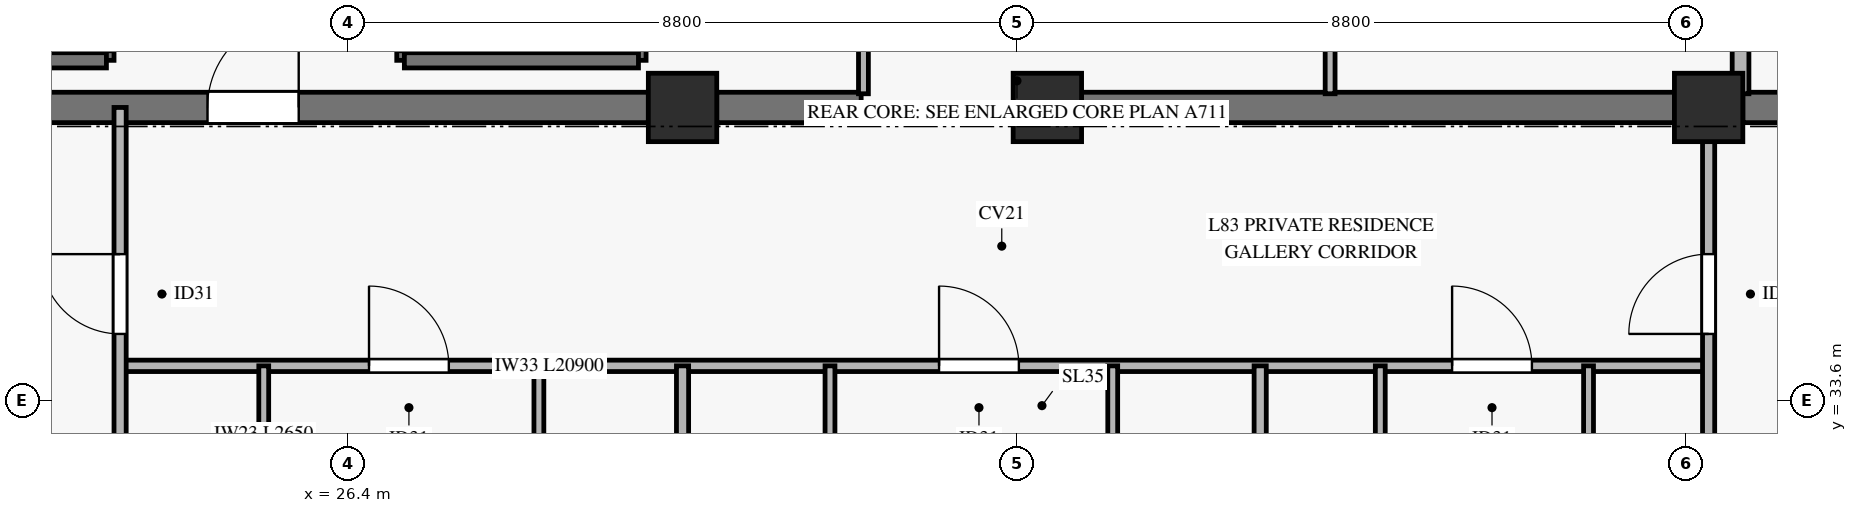
"""IFC4 building model, lengths in metres.
Left out: names, types, materials, properties, quantities, classifications, styles, units other than length and angle.
Written with IfcOpenShell. Run it as: python <this file> out.ifc"""

import sys

from ifc_helpers import new_model, si_unit, direction, frame, frame_2d, origin, origin_2d, place, context, subcontext, project, spatial, rectangle, extrude, source, transform, mapped, element, fill, save


model = new_model("IFC4")
c1 = context("Model", 3, precision=1e-05, world=origin(), true_north=direction((0.0, 1.0)))
c2 = subcontext(c1, "Body", "Model", "MODEL_VIEW")
j1 = project(units=[si_unit("LENGTHUNIT", "METRE"), si_unit("PLANEANGLEUNIT", "RADIAN")], contexts=[c1])
p1 = place(None, origin())
s1 = spatial("IfcSite", under=j1, at=p1, CompositionType="ELEMENT")
p2 = place(p1, origin())
s2 = spatial("IfcBuilding", under=s1, at=p2, CompositionType="ELEMENT")
p3 = place(p2, frame((0.0, 0.0, 321.0)))
s3 = spatial("IfcBuildingStorey", under=s2, at=p3, CompositionType="ELEMENT", Elevation=321.0)
m1 = source(origin(), c2, "Body", "SweptSolid", [
    extrude(rectangle(XDim=0.9, YDim=0.9, at=origin_2d()), origin(), (0.0, 0.0, 1.0), 3.185),
])
for number, where, z_axis, x_axis in (
    (1, (30.8, 37.45, 0.0), (0.0, 0.0, 1.0), (1.0, 0.0, 0.0)),
    (2, (35.6, 37.45, 0.0), (0.0, 0.0, 1.0), (1.0, 0.0, 0.0)),
    (3, (44.3, 37.45, 0.0), (0.0, 0.0, 1.0), (1.0, 0.0, 0.0)),
):
    element("IfcColumn", number, at=place(p3, frame(where, z_axis=z_axis, x_axis=x_axis)), inside=s3, PredefinedType="PILASTER", context=c2, shape_type="MappedRepresentation", body=[
        mapped(m1, transform((0.0, 0.0, 0.0), x_axis=(1.0, 0.0, 0.0), y_axis=(0.0, 1.0, 0.0), z_axis=(0.0, 0.0, 1.0), scale=1.0)),
    ])
p4 = place(p3, frame((20.3, 37.45, 0.0), z_axis=(0.0, 0.0, 1.0), x_axis=(1.0, 0.0, 0.0)))
e4 = element("IfcWall", 4, at=p4, inside=s3, PredefinedType="SHEAR", context=c2, shape_type="SweptSolid", body=[
    extrude(rectangle(XDim=10.05, YDim=0.4, at=frame_2d((5.025, 0.0))), origin(), (0.0, 0.0, 1.0), 3.185),
])
p5 = place(p4, frame((4.25, 0.0, 0.0)))
e5 = element("IfcOpeningElement", 5, at=p5, cuts=e4, PredefinedType="OPENING", context=c2, shape_type="SweptSolid", body=[
    extrude(rectangle(XDim=1.2, YDim=2.15, at=frame_2d((0.6, 1.075))), frame((0.0, 0.21, 0.0), z_axis=(0.0, -1.0, 0.0), x_axis=(1.0, 0.0, 0.0)), (0.0, 0.0, 1.0), 0.42),
])
p6 = place(p3, frame((31.25, 37.45, 0.0), z_axis=(0.0, 0.0, 1.0), x_axis=(1.0, 0.0, 0.0)))
e6 = element("IfcWall", 6, at=p6, inside=s3, PredefinedType="SHEAR", context=c2, shape_type="SweptSolid", body=[
    extrude(rectangle(XDim=1.9, YDim=0.4, at=frame_2d((0.95, 0.0))), origin(), (0.0, 0.0, 1.0), 3.185),
])
p7 = place(p3, frame((36.05, 37.45, 0.0), z_axis=(0.0, 0.0, 1.0), x_axis=(1.0, 0.0, 0.0)))
e7 = element("IfcWall", 7, at=p7, inside=s3, PredefinedType="SHEAR", context=c2, shape_type="SweptSolid", body=[
    extrude(rectangle(XDim=7.8, YDim=0.4, at=frame_2d((3.9, 0.0))), origin(), (0.0, 0.0, 1.0), 3.185),
])
p8 = place(p3, frame((44.75, 37.45, 0.0), z_axis=(0.0, 0.0, 1.0), x_axis=(1.0, 0.0, 0.0)))
e8 = element("IfcWall", 8, at=p8, inside=s3, PredefinedType="SHEAR", context=c2, shape_type="SweptSolid", body=[
    extrude(rectangle(XDim=5.35, YDim=0.4, at=frame_2d((2.675, 0.0))), origin(), (0.0, 0.0, 1.0), 3.185),
])
p9 = place(p8, frame((0.7, 0.0, 0.0)))
e9 = element("IfcOpeningElement", 9, at=p9, cuts=e8, PredefinedType="OPENING", context=c2, shape_type="SweptSolid", body=[
    extrude(rectangle(XDim=1.2, YDim=2.15, at=frame_2d((0.6, 1.075))), frame((0.0, 0.21, 0.0), z_axis=(0.0, -1.0, 0.0), x_axis=(1.0, 0.0, 0.0)), (0.0, 0.0, 1.0), 0.42),
])
p10 = place(p3, frame((23.22, 38.07, 0.0), z_axis=(0.0, 0.0, 1.0), x_axis=(0.0, 1.0, 0.0)))
e10 = element("IfcWall", 10, at=p10, inside=s3, PredefinedType="SOLIDWALL", context=c2, shape_type="SweptSolid", body=[
    extrude(rectangle(XDim=7.25, YDim=0.2, at=frame_2d((3.625, 0.0))), origin(), (0.0, 0.0, 1.0), 3.4),
])
p11 = place(p10, frame((0.11, 0.0, 0.0)))
e11 = element("IfcOpeningElement", 11, at=p11, cuts=e10, PredefinedType="OPENING", context=c2, shape_type="SweptSolid", body=[
    extrude(rectangle(XDim=1.1, YDim=2.15, at=frame_2d((0.55, 1.075))), frame((0.0, 0.11, 0.0), z_axis=(0.0, -1.0, 0.0), x_axis=(1.0, 0.0, 0.0)), (0.0, 0.0, 1.0), 0.22),
])
p12 = place(p3, frame((20.17, 38.07, 0.0), z_axis=(0.0, 0.0, 1.0), x_axis=(1.0, 0.0, 0.0)))
e12 = element("IfcWall", 12, at=p12, inside=s3, PredefinedType="SOLIDWALL", context=c2, shape_type="SweptSolid", body=[
    extrude(rectangle(XDim=3.05, YDim=0.2, at=frame_2d((1.525, 0.0))), origin(), (0.0, 0.0, 1.0), 3.4),
])
p13 = place(p3, frame((27.14, 38.07, 0.0), z_axis=(0.0, 0.0, 1.0), x_axis=(0.0, 1.0, 0.0)))
e13 = element("IfcWall", 13, at=p13, inside=s3, PredefinedType="SOLIDWALL", context=c2, shape_type="SweptSolid", body=[
    extrude(rectangle(XDim=7.25, YDim=0.2, at=frame_2d((3.625, 0.0))), origin(), (0.0, 0.0, 1.0), 3.4),
])
p14 = place(p13, frame((0.11, 0.0, 0.0)))
e14 = element("IfcOpeningElement", 14, at=p14, cuts=e13, PredefinedType="OPENING", context=c2, shape_type="SweptSolid", body=[
    extrude(rectangle(XDim=1.1, YDim=2.15, at=frame_2d((0.55, 1.075))), frame((0.0, 0.11, 0.0), z_axis=(0.0, -1.0, 0.0), x_axis=(1.0, 0.0, 0.0)), (0.0, 0.0, 1.0), 0.22),
])
p15 = place(p3, frame((30.22, 38.07, 0.0), z_axis=(0.0, 0.0, 1.0), x_axis=(0.0, 1.0, 0.0)))
e15 = element("IfcWall", 15, at=p15, inside=s3, PredefinedType="SOLIDWALL", context=c2, shape_type="SweptSolid", body=[
    extrude(rectangle(XDim=7.25, YDim=0.2, at=frame_2d((3.625, 0.0))), origin(), (0.0, 0.0, 1.0), 3.4),
])
p16 = place(p3, frame((27.14, 38.07, 0.0), z_axis=(0.0, 0.0, 1.0), x_axis=(1.0, 0.0, 0.0)))
e16 = element("IfcWall", 16, at=p16, inside=s3, PredefinedType="SOLIDWALL", context=c2, shape_type="SweptSolid", body=[
    extrude(rectangle(XDim=3.08, YDim=0.2, at=frame_2d((1.54, 0.0))), origin(), (0.0, 0.0, 1.0), 3.4),
])
p17 = place(p3, frame((44.72, 37.63, 0.0), z_axis=(0.0, 0.0, 1.0), x_axis=(0.0, 1.0, 0.0)))
e17 = element("IfcWall", 17, at=p17, inside=s3, PredefinedType="SOLIDWALL", context=c2, shape_type="SweptSolid", body=[
    extrude(rectangle(XDim=7.59, YDim=0.22, at=frame_2d((3.795, 0.0))), origin(), (0.0, 0.0, 1.0), 3.185),
])
p18 = place(p3, frame((33.18, 37.63, 0.0), z_axis=(0.0, 0.0, 1.0), x_axis=(0.0, 1.0, 0.0)))
e18 = element("IfcWall", 18, at=p18, inside=s3, PredefinedType="PARTITIONING", context=c2, shape_type="SweptSolid", body=[
    extrude(rectangle(XDim=6.52, YDim=0.13, at=frame_2d((3.26, 0.0))), origin(), (0.0, 0.0, 1.0), 2.27),
])
p19 = place(p18, frame((2.27, 0.0, 0.0)))
e19 = element("IfcOpeningElement", 19, at=p19, cuts=e18, PredefinedType="OPENING", context=c2, shape_type="SweptSolid", body=[
    extrude(rectangle(XDim=0.9, YDim=2.1, at=frame_2d((0.45, 1.05))), frame((0.0, 0.075, 0.0), z_axis=(0.0, -1.0, 0.0), x_axis=(1.0, 0.0, 0.0)), (0.0, 0.0, 1.0), 0.15),
])
p20 = place(p3, frame((39.32, 37.63, 0.0), z_axis=(0.0, 0.0, 1.0), x_axis=(0.0, 1.0, 0.0)))
e20 = element("IfcWall", 20, at=p20, inside=s3, PredefinedType="PARTITIONING", context=c2, shape_type="SweptSolid", body=[
    extrude(rectangle(XDim=8.74, YDim=0.13, at=frame_2d((4.37, 0.0))), origin(), (0.0, 0.0, 1.0), 3.185),
])
p21 = place(p20, frame((4.89, 0.0, 0.0)))
e21 = element("IfcOpeningElement", 21, at=p21, cuts=e20, PredefinedType="OPENING", context=c2, shape_type="SweptSolid", body=[
    extrude(rectangle(XDim=0.9, YDim=2.1, at=frame_2d((0.45, 1.05))), frame((0.0, 0.075, 0.0), z_axis=(0.0, -1.0, 0.0), x_axis=(1.0, 0.0, 0.0)), (0.0, 0.0, 1.0), 0.15),
])
p22 = place(p3, frame((23.4, 34.05, 0.0), z_axis=(0.0, 0.0, 1.0), x_axis=(1.0, 0.0, 0.0)))
e22 = element("IfcWall", 22, at=p22, inside=s3, PredefinedType="PARTITIONING", context=c2, shape_type="SweptSolid", body=[
    extrude(rectangle(XDim=20.9, YDim=0.15, at=frame_2d((10.45, 0.0))), origin(), (0.0, 0.0, 1.0), 2.47),
])
p23 = place(p22, frame((3.275, 0.0, 0.0)))
e23 = element("IfcOpeningElement", 23, at=p23, cuts=e22, PredefinedType="OPENING", context=c2, shape_type="SweptSolid", body=[
    extrude(rectangle(XDim=1.05, YDim=2.15, at=frame_2d((0.525, 1.075))), frame((0.0, 0.085, 0.0), z_axis=(0.0, -1.0, 0.0), x_axis=(1.0, 0.0, 0.0)), (0.0, 0.0, 1.0), 0.17),
])
p24 = place(p22, frame((10.775, 0.0, 0.0)))
e24 = element("IfcOpeningElement", 24, at=p24, cuts=e22, PredefinedType="OPENING", context=c2, shape_type="SweptSolid", body=[
    extrude(rectangle(XDim=1.05, YDim=2.15, at=frame_2d((0.525, 1.075))), frame((0.0, 0.085, 0.0), z_axis=(0.0, -1.0, 0.0), x_axis=(1.0, 0.0, 0.0)), (0.0, 0.0, 1.0), 0.17),
])
p25 = place(p22, frame((17.525, 0.0, 0.0)))
e25 = element("IfcOpeningElement", 25, at=p25, cuts=e22, PredefinedType="OPENING", context=c2, shape_type="SweptSolid", body=[
    extrude(rectangle(XDim=1.05, YDim=2.15, at=frame_2d((0.525, 1.075))), frame((0.0, 0.085, 0.0), z_axis=(0.0, -1.0, 0.0), x_axis=(1.0, 0.0, 0.0)), (0.0, 0.0, 1.0), 0.17),
])
p26 = place(p3, frame((23.4, 20.704, 0.0), z_axis=(0.0, 0.0, 1.0), x_axis=(0.0, 1.0, 0.0)))
e26 = element("IfcWall", 26, at=p26, inside=s3, PredefinedType="PARTITIONING", context=c2, shape_type="SweptSolid", body=[
    extrude(rectangle(XDim=16.746, YDim=0.16, at=frame_2d((8.373, 0.0))), origin(), (0.0, 0.0, 1.0), 2.77),
])
p27 = place(p26, frame((13.766, 0.0, 0.0)))
e27 = element("IfcOpeningElement", 27, at=p27, cuts=e26, PredefinedType="OPENING", context=c2, shape_type="SweptSolid", body=[
    extrude(rectangle(XDim=1.05, YDim=2.15, at=frame_2d((0.525, 1.075))), frame((0.0, 0.09, 0.0), z_axis=(0.0, -1.0, 0.0), x_axis=(1.0, 0.0, 0.0)), (0.0, 0.0, 1.0), 0.18),
])
p28 = place(p3, frame((30.8, 20.704, 0.0), z_axis=(0.0, 0.0, 1.0), x_axis=(0.0, 1.0, 0.0)))
e28 = element("IfcWall", 28, at=p28, inside=s3, PredefinedType="PARTITIONING", context=c2, shape_type="SweptSolid", body=[
    extrude(rectangle(XDim=13.346, YDim=0.16, at=frame_2d((6.673, 0.0))), origin(), (0.0, 0.0, 1.0), 2.47),
])
p29 = place(p3, frame((38.4, 20.704, 0.0), z_axis=(0.0, 0.0, 1.0), x_axis=(0.0, 1.0, 0.0)))
e29 = element("IfcWall", 29, at=p29, inside=s3, PredefinedType="PARTITIONING", context=c2, shape_type="SweptSolid", body=[
    extrude(rectangle(XDim=13.346, YDim=0.16, at=frame_2d((6.673, 0.0))), origin(), (0.0, 0.0, 1.0), 2.77),
])
p30 = place(p3, frame((44.3, 20.704, 0.0), z_axis=(0.0, 0.0, 1.0), x_axis=(0.0, 1.0, 0.0)))
e30 = element("IfcWall", 30, at=p30, inside=s3, PredefinedType="PARTITIONING", context=c2, shape_type="SweptSolid", body=[
    extrude(rectangle(XDim=16.746, YDim=0.16, at=frame_2d((8.373, 0.0))), origin(), (0.0, 0.0, 1.0), 2.47),
])
p31 = place(p30, frame((13.766, 0.0, 0.0)))
e31 = element("IfcOpeningElement", 31, at=p31, cuts=e30, PredefinedType="OPENING", context=c2, shape_type="SweptSolid", body=[
    extrude(rectangle(XDim=1.05, YDim=2.15, at=frame_2d((0.525, 1.075))), frame((0.0, 0.09, 0.0), z_axis=(0.0, -1.0, 0.0), x_axis=(1.0, 0.0, 0.0)), (0.0, 0.0, 1.0), 0.18),
])
p32 = place(p3, frame((25.29, 31.4, 0.0), z_axis=(0.0, 0.0, 1.0), x_axis=(0.0, 1.0, 0.0)))
e32 = element("IfcWall", 32, at=p32, inside=s3, PredefinedType="PARTITIONING", context=c2, shape_type="SweptSolid", body=[
    extrude(rectangle(XDim=2.65, YDim=0.13, at=frame_2d((1.325, 0.0))), origin(), (0.0, 0.0, 1.0), 2.77),
])
p33 = place(p3, frame((28.91, 31.4, 0.0), z_axis=(0.0, 0.0, 1.0), x_axis=(0.0, 1.0, 0.0)))
e33 = element("IfcWall", 33, at=p33, inside=s3, PredefinedType="PARTITIONING", context=c2, shape_type="SweptSolid", body=[
    extrude(rectangle(XDim=2.65, YDim=0.13, at=frame_2d((1.325, 0.0))), origin(), (0.0, 0.0, 1.0), 2.77),
])
p34 = place(p33, frame((0.67, 0.0, 0.0)))
e34 = element("IfcOpeningElement", 34, at=p34, cuts=e33, PredefinedType="OPENING", context=c2, shape_type="SweptSolid", body=[
    extrude(rectangle(XDim=0.9, YDim=2.1, at=frame_2d((0.45, 1.05))), frame((0.0, 0.075, 0.0), z_axis=(0.0, -1.0, 0.0), x_axis=(1.0, 0.0, 0.0)), (0.0, 0.0, 1.0), 0.15),
])
p35 = place(p3, frame((32.74, 31.4, 0.0), z_axis=(0.0, 0.0, 1.0), x_axis=(0.0, 1.0, 0.0)))
e35 = element("IfcWall", 35, at=p35, inside=s3, PredefinedType="PARTITIONING", context=c2, shape_type="SweptSolid", body=[
    extrude(rectangle(XDim=2.65, YDim=0.13, at=frame_2d((1.325, 0.0))), origin(), (0.0, 0.0, 1.0), 2.77),
])
p36 = place(p3, frame((36.46, 31.4, 0.0), z_axis=(0.0, 0.0, 1.0), x_axis=(0.0, 1.0, 0.0)))
e36 = element("IfcWall", 36, at=p36, inside=s3, PredefinedType="PARTITIONING", context=c2, shape_type="SweptSolid", body=[
    extrude(rectangle(XDim=2.65, YDim=0.13, at=frame_2d((1.325, 0.0))), origin(), (0.0, 0.0, 1.0), 2.77),
])
p37 = place(p36, frame((0.67, 0.0, 0.0)))
e37 = element("IfcOpeningElement", 37, at=p37, cuts=e36, PredefinedType="OPENING", context=c2, shape_type="SweptSolid", body=[
    extrude(rectangle(XDim=0.9, YDim=2.1, at=frame_2d((0.45, 1.05))), frame((0.0, 0.075, 0.0), z_axis=(0.0, -1.0, 0.0), x_axis=(1.0, 0.0, 0.0)), (0.0, 0.0, 1.0), 0.15),
])
p38 = place(p3, frame((39.98, 31.4, 0.0), z_axis=(0.0, 0.0, 1.0), x_axis=(0.0, 1.0, 0.0)))
e38 = element("IfcWall", 38, at=p38, inside=s3, PredefinedType="PARTITIONING", context=c2, shape_type="SweptSolid", body=[
    extrude(rectangle(XDim=2.65, YDim=0.13, at=frame_2d((1.325, 0.0))), origin(), (0.0, 0.0, 1.0), 2.77),
])
p39 = place(p3, frame((42.72, 31.4, 0.0), z_axis=(0.0, 0.0, 1.0), x_axis=(0.0, 1.0, 0.0)))
e39 = element("IfcWall", 39, at=p39, inside=s3, PredefinedType="PARTITIONING", context=c2, shape_type="SweptSolid", body=[
    extrude(rectangle(XDim=2.65, YDim=0.13, at=frame_2d((1.325, 0.0))), origin(), (0.0, 0.0, 1.0), 2.77),
])
p40 = place(p39, frame((0.67, 0.0, 0.0)))
e40 = element("IfcOpeningElement", 40, at=p40, cuts=e39, PredefinedType="OPENING", context=c2, shape_type="SweptSolid", body=[
    extrude(rectangle(XDim=0.9, YDim=2.1, at=frame_2d((0.45, 1.05))), frame((0.0, 0.075, 0.0), z_axis=(0.0, -1.0, 0.0), x_axis=(1.0, 0.0, 0.0)), (0.0, 0.0, 1.0), 0.15),
])
m2 = source(origin(), c2, "Body", "SweptSolid", [
    extrude(rectangle(XDim=1.2, YDim=2.15, at=frame_2d((0.6, 1.075))), frame((0.0, 0.025, 0.0), z_axis=(0.0, -1.0, 0.0), x_axis=(1.0, 0.0, 0.0)), (0.0, 0.0, 1.0), 0.05),
])
p41 = place(p5, origin())
e41 = element("IfcDoor", 41, at=p41, inside=s3, OperationType="SINGLE_SWING_RIGHT", PredefinedType="DOOR", context=c2, shape_type="MappedRepresentation", body=[
    mapped(m2, transform((0.0, 0.0, 0.0), x_axis=(1.0, 0.0, 0.0), y_axis=(0.0, 1.0, 0.0), z_axis=(0.0, 0.0, 1.0), scale=1.0)),
])
fill(e5, e41)
m3 = source(origin(), c2, "Body", "SweptSolid", [
    extrude(rectangle(XDim=1.05, YDim=2.15, at=frame_2d((0.525, 1.075))), frame((0.0, 0.025, 0.0), z_axis=(0.0, -1.0, 0.0), x_axis=(1.0, 0.0, 0.0)), (0.0, 0.0, 1.0), 0.05),
])
p42 = place(p27, origin())
e42 = element("IfcDoor", 42, at=p42, inside=s3, OperationType="SINGLE_SWING_RIGHT", PredefinedType="DOOR", context=c2, shape_type="MappedRepresentation", body=[
    mapped(m3, transform((0.0, 0.0, 0.0), x_axis=(1.0, 0.0, 0.0), y_axis=(0.0, 1.0, 0.0), z_axis=(0.0, 0.0, 1.0), scale=1.0)),
])
fill(e27, e42)
p43 = place(p23, origin())
e43 = element("IfcDoor", 43, at=p43, inside=s3, OperationType="SINGLE_SWING_LEFT", PredefinedType="DOOR", context=c2, shape_type="MappedRepresentation", body=[
    mapped(m3, transform((0.0, 0.0, 0.0), x_axis=(1.0, 0.0, 0.0), y_axis=(0.0, 1.0, 0.0), z_axis=(0.0, 0.0, 1.0), scale=1.0)),
])
fill(e23, e43)
p44 = place(p24, origin())
e44 = element("IfcDoor", 44, at=p44, inside=s3, OperationType="SINGLE_SWING_LEFT", PredefinedType="DOOR", context=c2, shape_type="MappedRepresentation", body=[
    mapped(m3, transform((0.0, 0.0, 0.0), x_axis=(1.0, 0.0, 0.0), y_axis=(0.0, 1.0, 0.0), z_axis=(0.0, 0.0, 1.0), scale=1.0)),
])
fill(e24, e44)
p45 = place(p25, origin())
e45 = element("IfcDoor", 45, at=p45, inside=s3, OperationType="SINGLE_SWING_LEFT", PredefinedType="DOOR", context=c2, shape_type="MappedRepresentation", body=[
    mapped(m3, transform((0.0, 0.0, 0.0), x_axis=(1.0, 0.0, 0.0), y_axis=(0.0, 1.0, 0.0), z_axis=(0.0, 0.0, 1.0), scale=1.0)),
])
fill(e25, e45)
p46 = place(p31, origin())
e46 = element("IfcDoor", 46, at=p46, inside=s3, OperationType="SINGLE_SWING_LEFT", PredefinedType="DOOR", context=c2, shape_type="MappedRepresentation", body=[
    mapped(m3, transform((0.0, 0.0, 0.0), x_axis=(1.0, 0.0, 0.0), y_axis=(0.0, 1.0, 0.0), z_axis=(0.0, 0.0, 1.0), scale=1.0)),
])
fill(e31, e46)
save(model, sys.argv[1])
